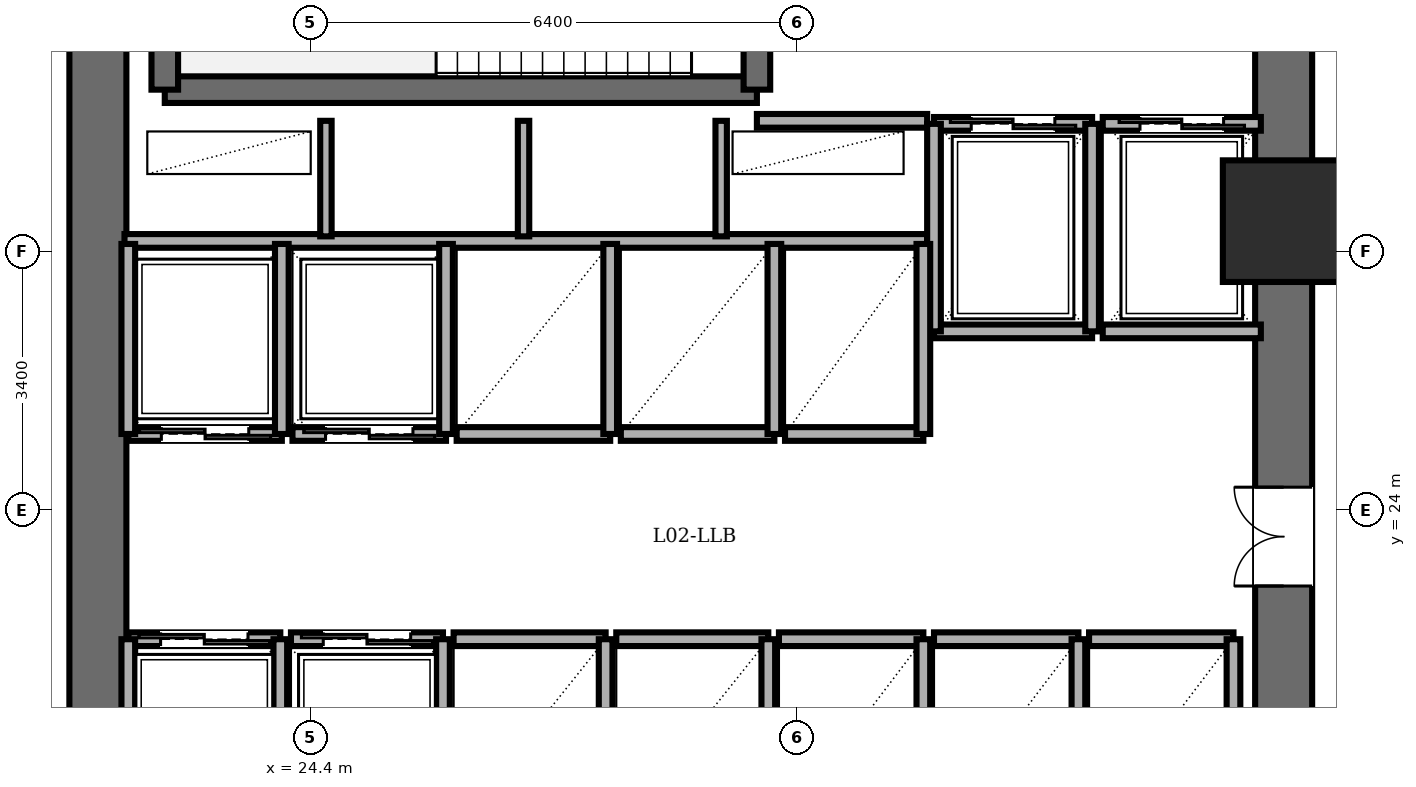
"""IFC4 building model, lengths in metres.
Left out: names, types, materials, properties, quantities, classifications, styles, units other than length and angle.
Written with IfcOpenShell. Run it as: python <this file> out.ifc"""

import sys

from ifc_helpers import new_model, si_unit, direction, frame, frame_2d, origin, origin_2d, place, context, subcontext, project, spatial, rectangle, extrude, element, fill, save


model = new_model("IFC4")
c1 = context("Model", 3, precision=1e-05, world=origin(), true_north=direction((0.0, 1.0)))
c2 = subcontext(c1, "Body", "Model", "MODEL_VIEW")
j1 = project(units=[si_unit("LENGTHUNIT", "METRE"), si_unit("PLANEANGLEUNIT", "RADIAN")], contexts=[c1])
p1 = place(None, origin())
s1 = spatial("IfcSite", under=j1, at=p1, CompositionType="ELEMENT")
p2 = place(p1, origin())
s2 = spatial("IfcBuilding", under=s1, at=p2, CompositionType="ELEMENT")
p3 = place(p2, frame((0.0, 0.0, 5.4)))
s3 = spatial("IfcBuildingStorey", under=s2, at=p3, CompositionType="ELEMENT", Elevation=5.4)
p4 = place(p3, frame((37.2, 27.8, 0.0), z_axis=(0.0, 0.0, 1.0), x_axis=(1.0, 0.0, 0.0)))
e1 = element("IfcColumn", 1, at=p4, inside=s3, PredefinedType="COLUMN", context=c2, shape_type="SweptSolid", body=[
    extrude(rectangle(XDim=1.6, YDim=1.6, at=origin_2d()), origin(), (0.0, 0.0, 1.0), 4.65),
])
p5 = place(p3, frame((21.6, 14.4, 0.0), z_axis=(0.0, 0.0, 1.0), x_axis=(0.0, 1.0, 0.0)))
e2 = element("IfcWall", 2, at=p5, inside=s3, PredefinedType="SHEAR", context=c2, shape_type="SweptSolid", body=[
    extrude(rectangle(XDim=19.2, YDim=0.75, at=frame_2d((9.6, 0.0))), origin(), (0.0, 0.0, 1.0), 4.43),
])
p6 = place(p3, frame((37.2, 14.4, 0.0), z_axis=(0.0, 0.0, 1.0), x_axis=(0.0, 1.0, 0.0)))
e3 = element("IfcWall", 3, at=p6, inside=s3, PredefinedType="SHEAR", context=c2, shape_type="SweptSolid", body=[
    extrude(rectangle(XDim=19.2, YDim=0.75, at=frame_2d((9.6, 0.0))), origin(), (0.0, 0.0, 1.0), 4.43),
])
p7 = place(p6, frame((15.8, 0.0, 0.0)))
e4 = element("IfcOpeningElement", 4, at=p7, cuts=e3, PredefinedType="OPENING", context=c2, shape_type="SweptSolid", body=[
    extrude(rectangle(XDim=1.15, YDim=2.15, at=frame_2d((0.575, 1.075))), frame((0.0, 0.385, 0.0), z_axis=(0.0, -1.0, 0.0), x_axis=(1.0, 0.0, 0.0)), (0.0, 0.0, 1.0), 0.77),
])
p8 = place(p6, frame((3.6, 0.0, 0.0)))
e5 = element("IfcOpeningElement", 5, at=p8, cuts=e3, PredefinedType="OPENING", context=c2, shape_type="SweptSolid", body=[
    extrude(rectangle(XDim=1.1, YDim=2.15, at=frame_2d((0.55, 1.075))), frame((0.0, 0.385, 0.0), z_axis=(0.0, -1.0, 0.0), x_axis=(1.0, 0.0, 0.0)), (0.0, 0.0, 1.0), 0.77),
])
p9 = place(p6, frame((8.6, 0.0, 0.0)))
e6 = element("IfcOpeningElement", 6, at=p9, cuts=e3, PredefinedType="OPENING", context=c2, shape_type="SweptSolid", body=[
    extrude(rectangle(XDim=1.3, YDim=2.2, at=frame_2d((0.65, 1.1))), frame((0.0, 0.385, 0.0), z_axis=(0.0, -1.0, 0.0), x_axis=(1.0, 0.0, 0.0)), (0.0, 0.0, 1.0), 0.77),
])
p10 = place(p3, frame((22.48, 29.53, 0.0), z_axis=(0.0, 0.0, 1.0), x_axis=(1.0, 0.0, 0.0)))
e7 = element("IfcWall", 7, at=p10, inside=s3, PredefinedType="SOLIDWALL", context=c2, shape_type="SweptSolid", body=[
    extrude(rectangle(XDim=7.79, YDim=0.35, at=frame_2d((3.895, 0.0))), origin(), (0.0, 0.0, 1.0), 4.43),
])
p11 = place(p3, frame((22.48, 29.53, 0.0), z_axis=(0.0, 0.0, 1.0), x_axis=(0.0, 1.0, 0.0)))
e8 = element("IfcWall", 8, at=p11, inside=s3, PredefinedType="SOLIDWALL", context=c2, shape_type="SweptSolid", body=[
    extrude(rectangle(XDim=3.58, YDim=0.35, at=frame_2d((1.79, 0.0))), origin(), (0.0, 0.0, 1.0), 4.43),
])
p12 = place(p3, frame((30.27, 29.53, 0.0), z_axis=(0.0, 0.0, 1.0), x_axis=(0.0, 1.0, 0.0)))
e9 = element("IfcWall", 9, at=p12, inside=s3, PredefinedType="SOLIDWALL", context=c2, shape_type="SweptSolid", body=[
    extrude(rectangle(XDim=3.58, YDim=0.35, at=frame_2d((1.79, 0.0))), origin(), (0.0, 0.0, 1.0), 4.43),
])
p13 = place(p12, frame((1.25, 0.0, 0.0)))
e10 = element("IfcOpeningElement", 10, at=p13, cuts=e9, PredefinedType="OPENING", context=c2, shape_type="SweptSolid", body=[
    extrude(rectangle(XDim=1.1, YDim=2.15, at=frame_2d((0.55, 1.075))), frame((0.0, 0.185, 0.0), z_axis=(0.0, -1.0, 0.0), x_axis=(1.0, 0.0, 0.0)), (0.0, 0.0, 1.0), 0.37),
])
p14 = place(p3, frame((30.27, 29.12, 0.0), z_axis=(0.0, 0.0, 1.0), x_axis=(1.0, 0.0, 0.0)))
e11 = element("IfcWall", 11, at=p14, inside=s3, PredefinedType="PARTITIONING", context=c2, shape_type="SweptSolid", body=[
    extrude(rectangle(XDim=2.24, YDim=0.18, at=frame_2d((1.12, 0.0))), origin(), (0.0, 0.0, 1.0), 4.43),
])
p15 = place(p3, frame((21.95, 27.54, 0.0), z_axis=(0.0, 0.0, 1.0), x_axis=(1.0, 0.0, 0.0)))
e12 = element("IfcWall", 12, at=p15, inside=s3, PredefinedType="PARTITIONING", context=c2, shape_type="SweptSolid", body=[
    extrude(rectangle(XDim=10.56, YDim=0.18, at=frame_2d((5.28, 0.0))), origin(), (0.0, 0.0, 1.0), 4.43),
])
for number, where, z_axis, x_axis in (
    (13, (24.6, 27.6, 0.0), (0.0, 0.0, 1.0), (0.0, 1.0, 0.0)),
    (14, (27.2, 27.6, 0.0), (0.0, 0.0, 1.0), (0.0, 1.0, 0.0)),
    (15, (29.8, 27.6, 0.0), (0.0, 0.0, 1.0), (0.0, 1.0, 0.0)),
):
    element("IfcWall", number, at=place(p3, frame(where, z_axis=z_axis, x_axis=x_axis)), inside=s3, PredefinedType="PARTITIONING", context=c2, shape_type="SweptSolid", body=[
        extrude(rectangle(XDim=1.52, YDim=0.15, at=frame_2d((0.76, 0.0))), origin(), (0.0, 0.0, 1.0), 4.43),
    ])
p16 = place(p3, frame((32.6, 29.08, 0.0), z_axis=(0.0, 0.0, 1.0), x_axis=(1.0, 0.0, 0.0)))
e16 = element("IfcWall", 16, at=p16, inside=s3, PredefinedType="PARTITIONING", context=c2, shape_type="SweptSolid", body=[
    extrude(rectangle(XDim=2.08, YDim=0.18, at=frame_2d((1.04, 0.0))), origin(), (0.0, 0.0, 1.0), 4.43),
])
p17 = place(p16, frame((0.49, 0.0, 0.0)))
e17 = element("IfcOpeningElement", 17, at=p17, cuts=e16, PredefinedType="OPENING", context=c2, shape_type="SweptSolid", body=[
    extrude(rectangle(XDim=1.1, YDim=2.2, at=frame_2d((0.55, 1.1))), frame((0.0, 0.1, 0.0), z_axis=(0.0, -1.0, 0.0), x_axis=(1.0, 0.0, 0.0)), (0.0, 0.0, 1.0), 0.2),
])
p18 = place(p3, frame((34.68, 26.35, 0.0), z_axis=(0.0, 0.0, 1.0), x_axis=(-1.0, 0.0, 0.0)))
e18 = element("IfcWall", 18, at=p18, inside=s3, PredefinedType="PARTITIONING", context=c2, shape_type="SweptSolid", body=[
    extrude(rectangle(XDim=2.08, YDim=0.18, at=frame_2d((1.04, 0.0))), origin(), (0.0, 0.0, 1.0), 4.43),
])
for number, where, z_axis, x_axis in (
    (19, (34.68, 26.35, 0.0), (0.0, 0.0, 1.0), (0.0, 1.0, 0.0)),
    (20, (32.6, 29.08, 0.0), (0.0, 0.0, 1.0), (0.0, -1.0, 0.0)),
):
    element("IfcWall", number, at=place(p3, frame(where, z_axis=z_axis, x_axis=x_axis)), inside=s3, PredefinedType="PARTITIONING", context=c2, shape_type="SweptSolid", body=[
        extrude(rectangle(XDim=2.73, YDim=0.18, at=frame_2d((1.365, 0.0))), origin(), (0.0, 0.0, 1.0), 4.43),
    ])
p19 = place(p3, frame((34.82, 29.08, 0.0), z_axis=(0.0, 0.0, 1.0), x_axis=(1.0, 0.0, 0.0)))
e21 = element("IfcWall", 21, at=p19, inside=s3, PredefinedType="PARTITIONING", context=c2, shape_type="SweptSolid", body=[
    extrude(rectangle(XDim=2.08, YDim=0.18, at=frame_2d((1.04, 0.0))), origin(), (0.0, 0.0, 1.0), 4.43),
])
p20 = place(p19, frame((0.49, 0.0, 0.0)))
e22 = element("IfcOpeningElement", 22, at=p20, cuts=e21, PredefinedType="OPENING", context=c2, shape_type="SweptSolid", body=[
    extrude(rectangle(XDim=1.1, YDim=2.2, at=frame_2d((0.55, 1.1))), frame((0.0, 0.1, 0.0), z_axis=(0.0, -1.0, 0.0), x_axis=(1.0, 0.0, 0.0)), (0.0, 0.0, 1.0), 0.2),
])
p21 = place(p3, frame((36.9, 26.35, 0.0), z_axis=(0.0, 0.0, 1.0), x_axis=(-1.0, 0.0, 0.0)))
e23 = element("IfcWall", 23, at=p21, inside=s3, PredefinedType="PARTITIONING", context=c2, shape_type="SweptSolid", body=[
    extrude(rectangle(XDim=2.08, YDim=0.18, at=frame_2d((1.04, 0.0))), origin(), (0.0, 0.0, 1.0), 4.43),
])
p22 = place(p3, frame((24.02, 25.0, 0.0), z_axis=(0.0, 0.0, 1.0), x_axis=(-1.0, 0.0, 0.0)))
e24 = element("IfcWall", 24, at=p22, inside=s3, PredefinedType="PARTITIONING", context=c2, shape_type="SweptSolid", body=[
    extrude(rectangle(XDim=2.02, YDim=0.18, at=frame_2d((1.01, 0.0))), origin(), (0.0, 0.0, 1.0), 4.43),
])
p23 = place(p22, frame((0.435, 0.0, 0.0)))
e25 = element("IfcOpeningElement", 25, at=p23, cuts=e24, PredefinedType="OPENING", context=c2, shape_type="SweptSolid", body=[
    extrude(rectangle(XDim=1.15, YDim=2.2, at=frame_2d((0.575, 1.1))), frame((0.0, 0.1, 0.0), z_axis=(0.0, -1.0, 0.0), x_axis=(1.0, 0.0, 0.0)), (0.0, 0.0, 1.0), 0.2),
])
for number, where, z_axis, x_axis in (
    (26, (24.02, 25.0, 0.0), (0.0, 0.0, 1.0), (0.0, 1.0, 0.0)),
    (27, (22.0, 27.5, 0.0), (0.0, 0.0, 1.0), (0.0, -1.0, 0.0)),
):
    element("IfcWall", number, at=place(p3, frame(where, z_axis=z_axis, x_axis=x_axis)), inside=s3, PredefinedType="PARTITIONING", context=c2, shape_type="SweptSolid", body=[
        extrude(rectangle(XDim=2.5, YDim=0.18, at=frame_2d((1.25, 0.0))), origin(), (0.0, 0.0, 1.0), 4.43),
    ])
p24 = place(p3, frame((26.18, 25.0, 0.0), z_axis=(0.0, 0.0, 1.0), x_axis=(-1.0, 0.0, 0.0)))
e28 = element("IfcWall", 28, at=p24, inside=s3, PredefinedType="PARTITIONING", context=c2, shape_type="SweptSolid", body=[
    extrude(rectangle(XDim=2.02, YDim=0.18, at=frame_2d((1.01, 0.0))), origin(), (0.0, 0.0, 1.0), 4.43),
])
p25 = place(p24, frame((0.435, 0.0, 0.0)))
e29 = element("IfcOpeningElement", 29, at=p25, cuts=e28, PredefinedType="OPENING", context=c2, shape_type="SweptSolid", body=[
    extrude(rectangle(XDim=1.15, YDim=2.2, at=frame_2d((0.575, 1.1))), frame((0.0, 0.1, 0.0), z_axis=(0.0, -1.0, 0.0), x_axis=(1.0, 0.0, 0.0)), (0.0, 0.0, 1.0), 0.2),
])
p26 = place(p3, frame((26.18, 25.0, 0.0), z_axis=(0.0, 0.0, 1.0), x_axis=(0.0, 1.0, 0.0)))
e30 = element("IfcWall", 30, at=p26, inside=s3, PredefinedType="PARTITIONING", context=c2, shape_type="SweptSolid", body=[
    extrude(rectangle(XDim=2.5, YDim=0.18, at=frame_2d((1.25, 0.0))), origin(), (0.0, 0.0, 1.0), 4.43),
])
p27 = place(p3, frame((22.0, 22.3, 0.0), z_axis=(0.0, 0.0, 1.0), x_axis=(1.0, 0.0, 0.0)))
e31 = element("IfcWall", 31, at=p27, inside=s3, PredefinedType="PARTITIONING", context=c2, shape_type="SweptSolid", body=[
    extrude(rectangle(XDim=2.0, YDim=0.18, at=frame_2d((1.0, 0.0))), origin(), (0.0, 0.0, 1.0), 4.43),
])
p28 = place(p27, frame((0.425, 0.0, 0.0)))
e32 = element("IfcOpeningElement", 32, at=p28, cuts=e31, PredefinedType="OPENING", context=c2, shape_type="SweptSolid", body=[
    extrude(rectangle(XDim=1.15, YDim=2.2, at=frame_2d((0.575, 1.1))), frame((0.0, 0.1, 0.0), z_axis=(0.0, -1.0, 0.0), x_axis=(1.0, 0.0, 0.0)), (0.0, 0.0, 1.0), 0.2),
])
for number, where, z_axis, x_axis in (
    (33, (24.0, 19.8, 0.0), (0.0, 0.0, 1.0), (0.0, 1.0, 0.0)),
    (34, (22.0, 22.3, 0.0), (0.0, 0.0, 1.0), (0.0, -1.0, 0.0)),
):
    element("IfcWall", number, at=place(p3, frame(where, z_axis=z_axis, x_axis=x_axis)), inside=s3, PredefinedType="PARTITIONING", context=c2, shape_type="SweptSolid", body=[
        extrude(rectangle(XDim=2.5, YDim=0.18, at=frame_2d((1.25, 0.0))), origin(), (0.0, 0.0, 1.0), 4.43),
    ])
p29 = place(p3, frame((24.14, 22.3, 0.0), z_axis=(0.0, 0.0, 1.0), x_axis=(1.0, 0.0, 0.0)))
e35 = element("IfcWall", 35, at=p29, inside=s3, PredefinedType="PARTITIONING", context=c2, shape_type="SweptSolid", body=[
    extrude(rectangle(XDim=2.0, YDim=0.18, at=frame_2d((1.0, 0.0))), origin(), (0.0, 0.0, 1.0), 4.43),
])
p30 = place(p29, frame((0.425, 0.0, 0.0)))
e36 = element("IfcOpeningElement", 36, at=p30, cuts=e35, PredefinedType="OPENING", context=c2, shape_type="SweptSolid", body=[
    extrude(rectangle(XDim=1.15, YDim=2.2, at=frame_2d((0.575, 1.1))), frame((0.0, 0.1, 0.0), z_axis=(0.0, -1.0, 0.0), x_axis=(1.0, 0.0, 0.0)), (0.0, 0.0, 1.0), 0.2),
])
p31 = place(p3, frame((26.14, 19.8, 0.0), z_axis=(0.0, 0.0, 1.0), x_axis=(0.0, 1.0, 0.0)))
e37 = element("IfcWall", 37, at=p31, inside=s3, PredefinedType="PARTITIONING", context=c2, shape_type="SweptSolid", body=[
    extrude(rectangle(XDim=2.5, YDim=0.18, at=frame_2d((1.25, 0.0))), origin(), (0.0, 0.0, 1.0), 4.43),
])
p32 = place(p3, frame((28.34, 25.0, 0.0), z_axis=(0.0, 0.0, 1.0), x_axis=(-1.0, 0.0, 0.0)))
e38 = element("IfcWall", 38, at=p32, inside=s3, PredefinedType="PARTITIONING", context=c2, shape_type="SweptSolid", body=[
    extrude(rectangle(XDim=2.02, YDim=0.18, at=frame_2d((1.01, 0.0))), origin(), (0.0, 0.0, 1.0), 4.43),
])
p33 = place(p3, frame((28.34, 25.0, 0.0), z_axis=(0.0, 0.0, 1.0), x_axis=(0.0, 1.0, 0.0)))
e39 = element("IfcWall", 39, at=p33, inside=s3, PredefinedType="PARTITIONING", context=c2, shape_type="SweptSolid", body=[
    extrude(rectangle(XDim=2.5, YDim=0.18, at=frame_2d((1.25, 0.0))), origin(), (0.0, 0.0, 1.0), 4.43),
])
p34 = place(p3, frame((30.5, 25.0, 0.0), z_axis=(0.0, 0.0, 1.0), x_axis=(-1.0, 0.0, 0.0)))
e40 = element("IfcWall", 40, at=p34, inside=s3, PredefinedType="PARTITIONING", context=c2, shape_type="SweptSolid", body=[
    extrude(rectangle(XDim=2.02, YDim=0.18, at=frame_2d((1.01, 0.0))), origin(), (0.0, 0.0, 1.0), 4.43),
])
p35 = place(p3, frame((30.5, 25.0, 0.0), z_axis=(0.0, 0.0, 1.0), x_axis=(0.0, 1.0, 0.0)))
e41 = element("IfcWall", 41, at=p35, inside=s3, PredefinedType="PARTITIONING", context=c2, shape_type="SweptSolid", body=[
    extrude(rectangle(XDim=2.5, YDim=0.18, at=frame_2d((1.25, 0.0))), origin(), (0.0, 0.0, 1.0), 4.43),
])
p36 = place(p3, frame((26.28, 22.3, 0.0), z_axis=(0.0, 0.0, 1.0), x_axis=(1.0, 0.0, 0.0)))
e42 = element("IfcWall", 42, at=p36, inside=s3, PredefinedType="PARTITIONING", context=c2, shape_type="SweptSolid", body=[
    extrude(rectangle(XDim=2.0, YDim=0.18, at=frame_2d((1.0, 0.0))), origin(), (0.0, 0.0, 1.0), 4.43),
])
p37 = place(p3, frame((28.28, 19.8, 0.0), z_axis=(0.0, 0.0, 1.0), x_axis=(0.0, 1.0, 0.0)))
e43 = element("IfcWall", 43, at=p37, inside=s3, PredefinedType="PARTITIONING", context=c2, shape_type="SweptSolid", body=[
    extrude(rectangle(XDim=2.5, YDim=0.18, at=frame_2d((1.25, 0.0))), origin(), (0.0, 0.0, 1.0), 4.43),
])
p38 = place(p3, frame((28.42, 22.3, 0.0), z_axis=(0.0, 0.0, 1.0), x_axis=(1.0, 0.0, 0.0)))
e44 = element("IfcWall", 44, at=p38, inside=s3, PredefinedType="PARTITIONING", context=c2, shape_type="SweptSolid", body=[
    extrude(rectangle(XDim=2.0, YDim=0.18, at=frame_2d((1.0, 0.0))), origin(), (0.0, 0.0, 1.0), 4.43),
])
p39 = place(p3, frame((30.42, 19.8, 0.0), z_axis=(0.0, 0.0, 1.0), x_axis=(0.0, 1.0, 0.0)))
e45 = element("IfcWall", 45, at=p39, inside=s3, PredefinedType="PARTITIONING", context=c2, shape_type="SweptSolid", body=[
    extrude(rectangle(XDim=2.5, YDim=0.18, at=frame_2d((1.25, 0.0))), origin(), (0.0, 0.0, 1.0), 4.43),
])
p40 = place(p3, frame((32.46, 25.0, 0.0), z_axis=(0.0, 0.0, 1.0), x_axis=(-1.0, 0.0, 0.0)))
e46 = element("IfcWall", 46, at=p40, inside=s3, PredefinedType="PARTITIONING", context=c2, shape_type="SweptSolid", body=[
    extrude(rectangle(XDim=1.82, YDim=0.18, at=frame_2d((0.91, 0.0))), origin(), (0.0, 0.0, 1.0), 4.43),
])
p41 = place(p3, frame((32.46, 25.0, 0.0), z_axis=(0.0, 0.0, 1.0), x_axis=(0.0, 1.0, 0.0)))
e47 = element("IfcWall", 47, at=p41, inside=s3, PredefinedType="PARTITIONING", context=c2, shape_type="SweptSolid", body=[
    extrude(rectangle(XDim=2.5, YDim=0.18, at=frame_2d((1.25, 0.0))), origin(), (0.0, 0.0, 1.0), 4.43),
])
p42 = place(p3, frame((30.56, 22.3, 0.0), z_axis=(0.0, 0.0, 1.0), x_axis=(1.0, 0.0, 0.0)))
e48 = element("IfcWall", 48, at=p42, inside=s3, PredefinedType="PARTITIONING", context=c2, shape_type="SweptSolid", body=[
    extrude(rectangle(XDim=1.9, YDim=0.18, at=frame_2d((0.95, 0.0))), origin(), (0.0, 0.0, 1.0), 4.43),
])
p43 = place(p3, frame((32.46, 19.8, 0.0), z_axis=(0.0, 0.0, 1.0), x_axis=(0.0, 1.0, 0.0)))
e49 = element("IfcWall", 49, at=p43, inside=s3, PredefinedType="PARTITIONING", context=c2, shape_type="SweptSolid", body=[
    extrude(rectangle(XDim=2.5, YDim=0.18, at=frame_2d((1.25, 0.0))), origin(), (0.0, 0.0, 1.0), 4.43),
])
p44 = place(p3, frame((32.6, 22.3, 0.0), z_axis=(0.0, 0.0, 1.0), x_axis=(1.0, 0.0, 0.0)))
e50 = element("IfcWall", 50, at=p44, inside=s3, PredefinedType="PARTITIONING", context=c2, shape_type="SweptSolid", body=[
    extrude(rectangle(XDim=1.9, YDim=0.18, at=frame_2d((0.95, 0.0))), origin(), (0.0, 0.0, 1.0), 4.43),
])
p45 = place(p3, frame((34.5, 19.8, 0.0), z_axis=(0.0, 0.0, 1.0), x_axis=(0.0, 1.0, 0.0)))
e51 = element("IfcWall", 51, at=p45, inside=s3, PredefinedType="PARTITIONING", context=c2, shape_type="SweptSolid", body=[
    extrude(rectangle(XDim=2.5, YDim=0.18, at=frame_2d((1.25, 0.0))), origin(), (0.0, 0.0, 1.0), 4.43),
])
p46 = place(p3, frame((34.64, 22.3, 0.0), z_axis=(0.0, 0.0, 1.0), x_axis=(1.0, 0.0, 0.0)))
e52 = element("IfcWall", 52, at=p46, inside=s3, PredefinedType="PARTITIONING", context=c2, shape_type="SweptSolid", body=[
    extrude(rectangle(XDim=1.9, YDim=0.18, at=frame_2d((0.95, 0.0))), origin(), (0.0, 0.0, 1.0), 4.43),
])
p47 = place(p3, frame((36.54, 19.8, 0.0), z_axis=(0.0, 0.0, 1.0), x_axis=(0.0, 1.0, 0.0)))
e53 = element("IfcWall", 53, at=p47, inside=s3, PredefinedType="PARTITIONING", context=c2, shape_type="SweptSolid", body=[
    extrude(rectangle(XDim=2.5, YDim=0.18, at=frame_2d((1.25, 0.0))), origin(), (0.0, 0.0, 1.0), 4.43),
])
p48 = place(p17, origin())
e54 = element("IfcDoor", 54, at=p48, inside=s3, OperationType="DOUBLE_DOOR_SLIDING", PredefinedType="DOOR", context=c2, shape_type="SweptSolid", body=[
    extrude(rectangle(XDim=1.1, YDim=2.2, at=frame_2d((0.55, 1.1))), frame((0.0, 0.025, 0.0), z_axis=(0.0, -1.0, 0.0), x_axis=(1.0, 0.0, 0.0)), (0.0, 0.0, 1.0), 0.05),
])
fill(e17, e54)
p49 = place(p20, origin())
e55 = element("IfcDoor", 55, at=p49, inside=s3, OperationType="DOUBLE_DOOR_SLIDING", PredefinedType="DOOR", context=c2, shape_type="SweptSolid", body=[
    extrude(rectangle(XDim=1.1, YDim=2.2, at=frame_2d((0.55, 1.1))), frame((0.0, 0.025, 0.0), z_axis=(0.0, -1.0, 0.0), x_axis=(1.0, 0.0, 0.0)), (0.0, 0.0, 1.0), 0.05),
])
fill(e22, e55)
p50 = place(p23, origin())
e56 = element("IfcDoor", 56, at=p50, inside=s3, OperationType="DOUBLE_DOOR_SLIDING", PredefinedType="DOOR", context=c2, shape_type="SweptSolid", body=[
    extrude(rectangle(XDim=1.15, YDim=2.2, at=frame_2d((0.575, 1.1))), frame((0.0, 0.025, 0.0), z_axis=(0.0, -1.0, 0.0), x_axis=(1.0, 0.0, 0.0)), (0.0, 0.0, 1.0), 0.05),
])
fill(e25, e56)
p51 = place(p25, origin())
e57 = element("IfcDoor", 57, at=p51, inside=s3, OperationType="DOUBLE_DOOR_SLIDING", PredefinedType="DOOR", context=c2, shape_type="SweptSolid", body=[
    extrude(rectangle(XDim=1.15, YDim=2.2, at=frame_2d((0.575, 1.1))), frame((0.0, 0.025, 0.0), z_axis=(0.0, -1.0, 0.0), x_axis=(1.0, 0.0, 0.0)), (0.0, 0.0, 1.0), 0.05),
])
fill(e29, e57)
p52 = place(p28, origin())
e58 = element("IfcDoor", 58, at=p52, inside=s3, OperationType="DOUBLE_DOOR_SLIDING", PredefinedType="DOOR", context=c2, shape_type="SweptSolid", body=[
    extrude(rectangle(XDim=1.15, YDim=2.2, at=frame_2d((0.575, 1.1))), frame((0.0, 0.025, 0.0), z_axis=(0.0, -1.0, 0.0), x_axis=(1.0, 0.0, 0.0)), (0.0, 0.0, 1.0), 0.05),
])
fill(e32, e58)
p53 = place(p30, origin())
e59 = element("IfcDoor", 59, at=p53, inside=s3, OperationType="DOUBLE_DOOR_SLIDING", PredefinedType="DOOR", context=c2, shape_type="SweptSolid", body=[
    extrude(rectangle(XDim=1.15, YDim=2.2, at=frame_2d((0.575, 1.1))), frame((0.0, 0.025, 0.0), z_axis=(0.0, -1.0, 0.0), x_axis=(1.0, 0.0, 0.0)), (0.0, 0.0, 1.0), 0.05),
])
fill(e36, e59)
p54 = place(p9, origin())
e60 = element("IfcDoor", 60, at=p54, inside=s3, OperationType="DOUBLE_DOOR_SINGLE_SWING", PredefinedType="DOOR", context=c2, shape_type="SweptSolid", body=[
    extrude(rectangle(XDim=1.3, YDim=2.2, at=frame_2d((0.65, 1.1))), frame((0.0, 0.025, 0.0), z_axis=(0.0, -1.0, 0.0), x_axis=(1.0, 0.0, 0.0)), (0.0, 0.0, 1.0), 0.05),
])
fill(e6, e60)
save(model, sys.argv[1])
